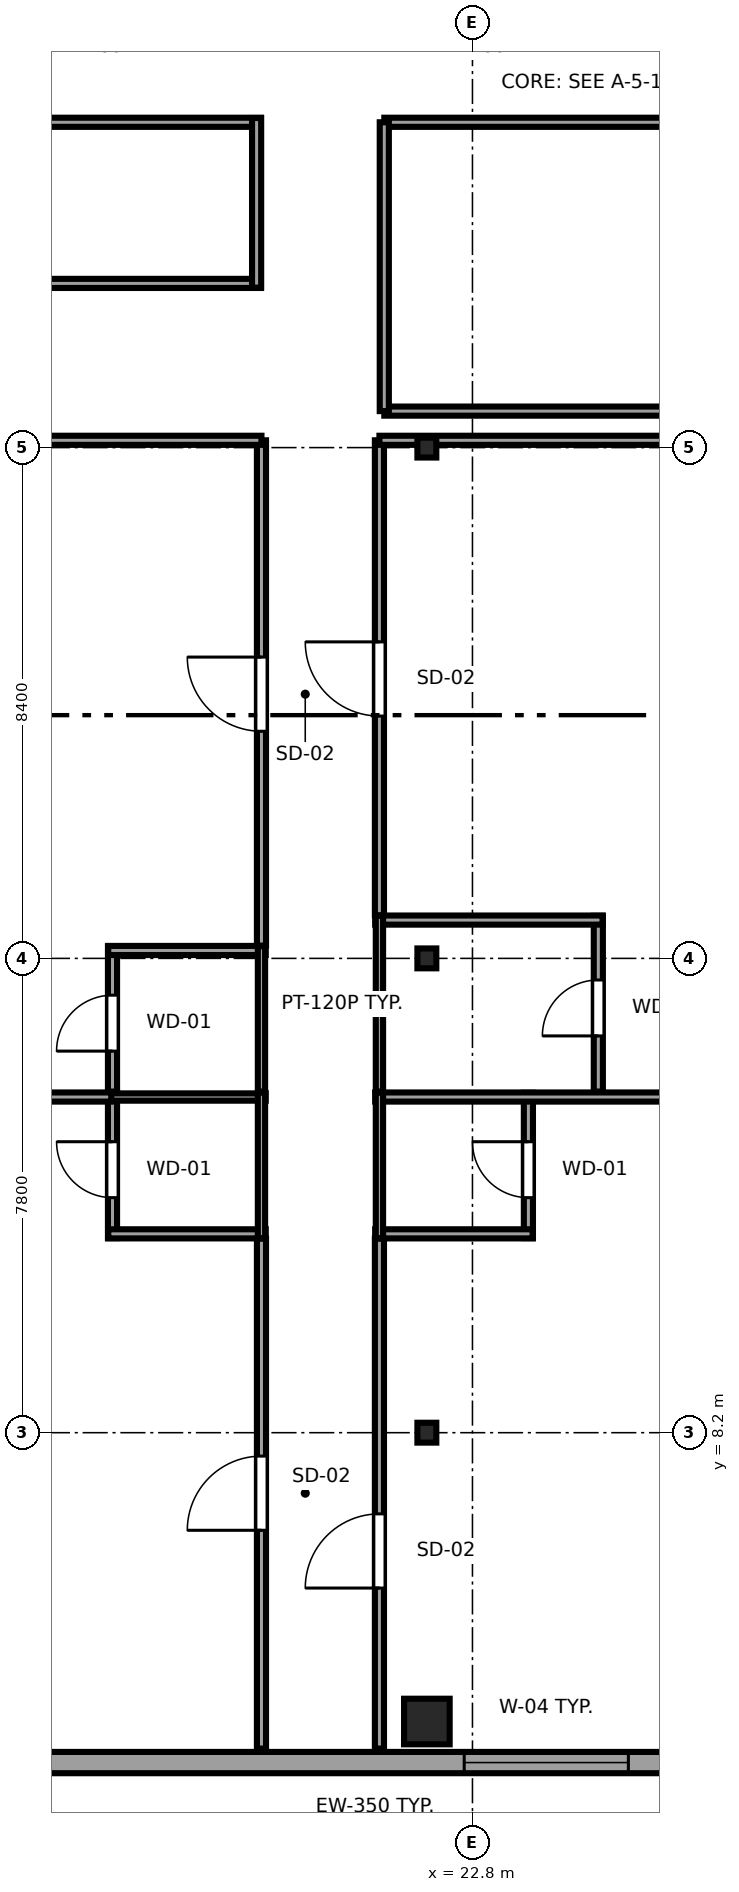
"""IFC4 building model, lengths in metres.
Left out: names, types, materials, properties, quantities, classifications, styles, units other than length and angle.
Written with IfcOpenShell. Run it as: python <this file> out.ifc"""

import sys

from ifc_helpers import new_model, si_unit, direction, frame, frame_2d, origin, origin_2d, place, context, subcontext, project, spatial, rectangle, i_section, extrude, source, transform, mapped, element, fill, save


model = new_model("IFC4")
c1 = context("Model", 3, precision=1e-05, world=origin(), true_north=direction((0.0, 1.0)))
c2 = subcontext(c1, "Body", "Model", "MODEL_VIEW")
j1 = project(units=[si_unit("LENGTHUNIT", "METRE"), si_unit("PLANEANGLEUNIT", "RADIAN")], contexts=[c1])
p1 = place(None, origin())
s1 = spatial("IfcSite", under=j1, at=p1, CompositionType="ELEMENT")
p2 = place(p1, origin())
s2 = spatial("IfcBuilding", under=s1, at=p2, CompositionType="ELEMENT")
p3 = place(p2, frame((0.0, 0.0, 223.9)))
s3 = spatial("IfcBuildingStorey", under=s2, at=p3, CompositionType="ELEMENT", Elevation=223.9)
m1 = source(origin(), c2, "Body", "SweptSolid", [
    extrude(rectangle(XDim=0.75, YDim=0.75, at=origin_2d()), origin(), (0.0, 0.0, 1.0), 3.55),
])
p4 = place(p3, frame((22.05, 3.45, 0.0), z_axis=(0.0, 0.0, 1.0), x_axis=(1.0, 0.0, 0.0)))
e1 = element("IfcColumn", 1, at=p4, inside=s3, PredefinedType="COLUMN", context=c2, shape_type="MappedRepresentation", body=[
    mapped(m1, transform((0.0, 0.0, 0.0), x_axis=(1.0, 0.0, 0.0), y_axis=(0.0, 1.0, 0.0), z_axis=(0.0, 0.0, 1.0), scale=1.0)),
])
m2 = source(origin(), c2, "Body", "SweptSolid", [
    extrude(i_section(OverallWidth=0.311, OverallDepth=0.327, WebThickness=0.016, FlangeThickness=0.025, FilletRadius=0.017, at=origin_2d()), origin(), (0.0, 0.0, 1.0), 3.55),
])
for number, where, z_axis, x_axis in (
    (2, (22.05, 8.2, 0.0), (0.0, 0.0, 1.0), (1.0, 0.0, 0.0)),
    (3, (22.05, 16.0, 0.0), (0.0, 0.0, 1.0), (1.0, 0.0, 0.0)),
    (4, (22.05, 24.4, 0.0), (0.0, 0.0, 1.0), (1.0, 0.0, 0.0)),
):
    element("IfcColumn", number, at=place(p3, frame(where, z_axis=z_axis, x_axis=x_axis)), inside=s3, PredefinedType="COLUMN", context=c2, shape_type="MappedRepresentation", body=[
        mapped(m2, transform((0.0, 0.0, 0.0), x_axis=(1.0, 0.0, 0.0), y_axis=(0.0, 1.0, 0.0), z_axis=(0.0, 0.0, 1.0), scale=1.0)),
    ])
p5 = place(p3, frame((7.017, 2.775, 0.0), z_axis=(0.0, 0.0, 1.0), x_axis=(1.0, 0.0, 0.0)))
e5 = element("IfcWall", 5, at=p5, inside=s3, PredefinedType="SOLIDWALL", context=c2, shape_type="SweptSolid", body=[
    extrude(rectangle(XDim=28.366, YDim=0.35, at=frame_2d((14.183, 0.0))), origin(), (0.0, 0.0, 1.0), 3.37),
])
p6 = place(p5, frame((1.514, 0.0, 0.68)))
e6 = element("IfcOpeningElement", 6, at=p6, cuts=e5, PredefinedType="OPENING", context=c2, shape_type="SweptSolid", body=[
    extrude(rectangle(XDim=2.7, YDim=1.95, at=frame_2d((1.35, 0.975))), frame((0.0, 0.185, 0.0), z_axis=(0.0, -1.0, 0.0), x_axis=(1.0, 0.0, 0.0)), (0.0, 0.0, 1.0), 0.37),
])
p7 = place(p5, frame((15.647, 0.0, 0.68)))
e7 = element("IfcOpeningElement", 7, at=p7, cuts=e5, PredefinedType="OPENING", context=c2, shape_type="SweptSolid", body=[
    extrude(rectangle(XDim=2.7, YDim=1.95, at=frame_2d((1.35, 0.975))), frame((0.0, 0.185, 0.0), z_axis=(0.0, -1.0, 0.0), x_axis=(1.0, 0.0, 0.0)), (0.0, 0.0, 1.0), 0.37),
])
p8 = place(p5, frame((24.152, 0.0, 0.68)))
e8 = element("IfcOpeningElement", 8, at=p8, cuts=e5, PredefinedType="OPENING", context=c2, shape_type="SweptSolid", body=[
    extrude(rectangle(XDim=2.7, YDim=1.95, at=frame_2d((1.35, 0.975))), frame((0.0, 0.185, 0.0), z_axis=(0.0, -1.0, 0.0), x_axis=(1.0, 0.0, 0.0)), (0.0, 0.0, 1.0), 0.37),
])
p9 = place(p3, frame((16.88, 11.4, 0.0), z_axis=(0.0, 0.0, 1.0), x_axis=(0.0, 1.0, 0.0)))
e9 = element("IfcWall", 9, at=p9, inside=s3, PredefinedType="PARTITIONING", context=c2, shape_type="SweptSolid", body=[
    extrude(rectangle(XDim=2.39, YDim=0.15, at=frame_2d((1.195, 0.0))), origin(), (0.0, 0.0, 1.0), 3.37),
])
p10 = place(p9, frame((0.665, 0.0, 0.0)))
e10 = element("IfcOpeningElement", 10, at=p10, cuts=e9, PredefinedType="OPENING", context=c2, shape_type="SweptSolid", body=[
    extrude(rectangle(XDim=0.92, YDim=2.01, at=frame_2d((0.46, 1.005))), frame((0.0, 0.085, 0.0), z_axis=(0.0, -1.0, 0.0), x_axis=(1.0, 0.0, 0.0)), (0.0, 0.0, 1.0), 0.17),
])
p11 = place(p3, frame((16.81, 11.47, 0.0), z_axis=(0.0, 0.0, 1.0), x_axis=(1.0, 0.0, 0.0)))
e11 = element("IfcWall", 11, at=p11, inside=s3, PredefinedType="PARTITIONING", context=c2, shape_type="SweptSolid", body=[
    extrude(rectangle(XDim=2.59, YDim=0.15, at=frame_2d((1.295, 0.0))), origin(), (0.0, 0.0, 1.0), 3.37),
])
p12 = place(p3, frame((16.81, 13.72, 0.0), z_axis=(0.0, 0.0, 1.0), x_axis=(1.0, 0.0, 0.0)))
e12 = element("IfcWall", 12, at=p12, inside=s3, PredefinedType="PLUMBINGWALL", context=c2, shape_type="SweptSolid", body=[
    extrude(rectangle(XDim=2.59, YDim=0.12, at=frame_2d((1.295, 0.0))), origin(), (0.0, 0.0, 1.0), 3.37),
])
p13 = place(p3, frame((19.33, 11.4, 0.0), z_axis=(0.0, 0.0, 1.0), x_axis=(0.0, 1.0, 0.0)))
e13 = element("IfcWall", 13, at=p13, inside=s3, PredefinedType="PLUMBINGWALL", context=c2, shape_type="SweptSolid", body=[
    extrude(rectangle(XDim=2.39, YDim=0.12, at=frame_2d((1.195, 0.0))), origin(), (0.0, 0.0, 1.0), 3.37),
])
p14 = place(p3, frame((16.88, 13.81, 0.0), z_axis=(0.0, 0.0, 1.0), x_axis=(0.0, 1.0, 0.0)))
e14 = element("IfcWall", 14, at=p14, inside=s3, PredefinedType="PARTITIONING", context=c2, shape_type="SweptSolid", body=[
    extrude(rectangle(XDim=2.39, YDim=0.15, at=frame_2d((1.195, 0.0))), origin(), (0.0, 0.0, 1.0), 3.37),
])
p15 = place(p14, frame((0.665, 0.0, 0.0)))
e15 = element("IfcOpeningElement", 15, at=p15, cuts=e14, PredefinedType="OPENING", context=c2, shape_type="SweptSolid", body=[
    extrude(rectangle(XDim=0.92, YDim=2.01, at=frame_2d((0.46, 1.005))), frame((0.0, 0.085, 0.0), z_axis=(0.0, -1.0, 0.0), x_axis=(1.0, 0.0, 0.0)), (0.0, 0.0, 1.0), 0.17),
])
p16 = place(p3, frame((16.81, 16.13, 0.0), z_axis=(0.0, 0.0, 1.0), x_axis=(1.0, 0.0, 0.0)))
e16 = element("IfcWall", 16, at=p16, inside=s3, PredefinedType="PARTITIONING", context=c2, shape_type="SweptSolid", body=[
    extrude(rectangle(XDim=2.59, YDim=0.15, at=frame_2d((1.295, 0.0))), origin(), (0.0, 0.0, 1.0), 2.758),
])
p17 = place(p3, frame((19.33, 13.81, 0.0), z_axis=(0.0, 0.0, 1.0), x_axis=(0.0, 1.0, 0.0)))
e17 = element("IfcWall", 17, at=p17, inside=s3, PredefinedType="PLUMBINGWALL", context=c2, shape_type="SweptSolid", body=[
    extrude(rectangle(XDim=2.39, YDim=0.12, at=frame_2d((1.195, 0.0))), origin(), (0.0, 0.0, 1.0), 3.37),
])
p18 = place(p3, frame((23.72, 11.4, 0.0), z_axis=(0.0, 0.0, 1.0), x_axis=(0.0, 1.0, 0.0)))
e18 = element("IfcWall", 18, at=p18, inside=s3, PredefinedType="PARTITIONING", context=c2, shape_type="SweptSolid", body=[
    extrude(rectangle(XDim=2.39, YDim=0.15, at=frame_2d((1.195, 0.0))), origin(), (0.0, 0.0, 1.0), 3.37),
])
p19 = place(p18, frame((0.665, 0.0, 0.0)))
e19 = element("IfcOpeningElement", 19, at=p19, cuts=e18, PredefinedType="OPENING", context=c2, shape_type="SweptSolid", body=[
    extrude(rectangle(XDim=0.92, YDim=2.01, at=frame_2d((0.46, 1.005))), frame((0.0, 0.085, 0.0), z_axis=(0.0, -1.0, 0.0), x_axis=(1.0, 0.0, 0.0)), (0.0, 0.0, 1.0), 0.17),
])
p20 = place(p3, frame((21.2, 11.47, 0.0), z_axis=(0.0, 0.0, 1.0), x_axis=(1.0, 0.0, 0.0)))
e20 = element("IfcWall", 20, at=p20, inside=s3, PredefinedType="PARTITIONING", context=c2, shape_type="SweptSolid", body=[
    extrude(rectangle(XDim=2.59, YDim=0.15, at=frame_2d((1.295, 0.0))), origin(), (0.0, 0.0, 1.0), 3.37),
])
p21 = place(p3, frame((21.2, 13.72, 0.0), z_axis=(0.0, 0.0, 1.0), x_axis=(1.0, 0.0, 0.0)))
e21 = element("IfcWall", 21, at=p21, inside=s3, PredefinedType="PARTITIONING", context=c2, shape_type="SweptSolid", body=[
    extrude(rectangle(XDim=18.195, YDim=0.15, at=frame_2d((9.098, 0.0))), origin(), (0.0, 0.0, 1.0), 3.37),
])
p22 = place(p3, frame((21.27, 11.4, 0.0), z_axis=(0.0, 0.0, 1.0), x_axis=(0.0, 1.0, 0.0)))
e22 = element("IfcWall", 22, at=p22, inside=s3, PredefinedType="PLUMBINGWALL", context=c2, shape_type="SweptSolid", body=[
    extrude(rectangle(XDim=2.39, YDim=0.12, at=frame_2d((1.195, 0.0))), origin(), (0.0, 0.0, 1.0), 3.37),
])
p23 = place(p3, frame((24.87, 13.81, 0.0), z_axis=(0.0, 0.0, 1.0), x_axis=(0.0, 1.0, 0.0)))
e23 = element("IfcWall", 23, at=p23, inside=s3, PredefinedType="PARTITIONING", context=c2, shape_type="SweptSolid", body=[
    extrude(rectangle(XDim=2.89, YDim=0.15, at=frame_2d((1.445, 0.0))), origin(), (0.0, 0.0, 1.0), 3.37),
])
p24 = place(p23, frame((0.915, 0.0, 0.0)))
e24 = element("IfcOpeningElement", 24, at=p24, cuts=e23, PredefinedType="OPENING", context=c2, shape_type="SweptSolid", body=[
    extrude(rectangle(XDim=0.92, YDim=2.01, at=frame_2d((0.46, 1.005))), frame((0.0, 0.085, 0.0), z_axis=(0.0, -1.0, 0.0), x_axis=(1.0, 0.0, 0.0)), (0.0, 0.0, 1.0), 0.17),
])
p25 = place(p3, frame((21.2, 16.63, 0.0), z_axis=(0.0, 0.0, 1.0), x_axis=(1.0, 0.0, 0.0)))
e25 = element("IfcWall", 25, at=p25, inside=s3, PredefinedType="PARTITIONING", context=c2, shape_type="SweptSolid", body=[
    extrude(rectangle(XDim=3.74, YDim=0.15, at=frame_2d((1.87, 0.0))), origin(), (0.0, 0.0, 1.0), 3.37),
])
p26 = place(p3, frame((21.27, 13.81, 0.0), z_axis=(0.0, 0.0, 1.0), x_axis=(0.0, 1.0, 0.0)))
e26 = element("IfcWall", 26, at=p26, inside=s3, PredefinedType="PLUMBINGWALL", context=c2, shape_type="SweptSolid", body=[
    extrude(rectangle(XDim=2.89, YDim=0.12, at=frame_2d((1.445, 0.0))), origin(), (0.0, 0.0, 1.0), 3.37),
])
p27 = place(p3, frame((19.33, 3.005, 0.0), z_axis=(0.0, 0.0, 1.0), x_axis=(0.0, 1.0, 0.0)))
e27 = element("IfcWall", 27, at=p27, inside=s3, PredefinedType="PARTITIONING", context=c2, shape_type="SweptSolid", body=[
    extrude(rectangle(XDim=8.385, YDim=0.15, at=frame_2d((4.192, 0.0))), origin(), (0.0, 0.0, 1.0), 3.37),
])
p28 = place(p27, frame((3.59, 0.0, 0.0)))
e28 = element("IfcOpeningElement", 28, at=p28, cuts=e27, PredefinedType="OPENING", context=c2, shape_type="SweptSolid", body=[
    extrude(rectangle(XDim=1.22, YDim=2.08, at=frame_2d((0.61, 1.04))), frame((0.0, 0.085, 0.0), z_axis=(0.0, -1.0, 0.0), x_axis=(1.0, 0.0, 0.0)), (0.0, 0.0, 1.0), 0.17),
])
p29 = place(p3, frame((2.9, 13.72, 0.0), z_axis=(0.0, 0.0, 1.0), x_axis=(1.0, 0.0, 0.0)))
e29 = element("IfcWall", 29, at=p29, inside=s3, PredefinedType="PARTITIONING", context=c2, shape_type="SweptSolid", body=[
    extrude(rectangle(XDim=13.96, YDim=0.15, at=frame_2d((6.98, 0.0))), origin(), (0.0, 0.0, 1.0), 3.37),
])
p30 = place(p3, frame((19.33, 16.21, 0.0), z_axis=(0.0, 0.0, 1.0), x_axis=(0.0, 1.0, 0.0)))
e30 = element("IfcWall", 30, at=p30, inside=s3, PredefinedType="PARTITIONING", context=c2, shape_type="SweptSolid", body=[
    extrude(rectangle(XDim=8.31, YDim=0.15, at=frame_2d((4.155, 0.0))), origin(), (0.0, 0.0, 1.0), 3.37),
])
p31 = place(p30, frame((3.525, 0.0, 0.0)))
e31 = element("IfcOpeningElement", 31, at=p31, cuts=e30, PredefinedType="OPENING", context=c2, shape_type="SweptSolid", body=[
    extrude(rectangle(XDim=1.22, YDim=2.08, at=frame_2d((0.61, 1.04))), frame((0.0, 0.085, 0.0), z_axis=(0.0, -1.0, 0.0), x_axis=(1.0, 0.0, 0.0)), (0.0, 0.0, 1.0), 0.17),
])
p32 = place(p3, frame((2.9, 24.52, 0.0), z_axis=(0.0, 0.0, 1.0), x_axis=(1.0, 0.0, 0.0)))
e32 = element("IfcWall", 32, at=p32, inside=s3, PredefinedType="PARTITIONING", context=c2, shape_type="SweptSolid", body=[
    extrude(rectangle(XDim=16.43, YDim=0.15, at=frame_2d((8.215, 0.0))), origin(), (0.0, 0.0, 1.0), 2.758),
])
p33 = place(p3, frame((21.27, 3.005, 0.0), z_axis=(0.0, 0.0, 1.0), x_axis=(0.0, 1.0, 0.0)))
e33 = element("IfcWall", 33, at=p33, inside=s3, PredefinedType="PARTITIONING", context=c2, shape_type="SweptSolid", body=[
    extrude(rectangle(XDim=8.385, YDim=0.15, at=frame_2d((4.192, 0.0))), origin(), (0.0, 0.0, 1.0), 3.37),
])
p34 = place(p33, frame((2.64, 0.0, 0.0)))
e34 = element("IfcOpeningElement", 34, at=p34, cuts=e33, PredefinedType="OPENING", context=c2, shape_type="SweptSolid", body=[
    extrude(rectangle(XDim=1.22, YDim=2.08, at=frame_2d((0.61, 1.04))), frame((0.0, 0.085, 0.0), z_axis=(0.0, -1.0, 0.0), x_axis=(1.0, 0.0, 0.0)), (0.0, 0.0, 1.0), 0.17),
])
p35 = place(p3, frame((21.27, 16.71, 0.0), z_axis=(0.0, 0.0, 1.0), x_axis=(0.0, 1.0, 0.0)))
e35 = element("IfcWall", 35, at=p35, inside=s3, PredefinedType="PARTITIONING", context=c2, shape_type="SweptSolid", body=[
    extrude(rectangle(XDim=7.81, YDim=0.15, at=frame_2d((3.905, 0.0))), origin(), (0.0, 0.0, 1.0), 3.37),
])
p36 = place(p35, frame((3.275, 0.0, 0.0)))
e36 = element("IfcOpeningElement", 36, at=p36, cuts=e35, PredefinedType="OPENING", context=c2, shape_type="SweptSolid", body=[
    extrude(rectangle(XDim=1.22, YDim=2.08, at=frame_2d((0.61, 1.04))), frame((0.0, 0.085, 0.0), z_axis=(0.0, -1.0, 0.0), x_axis=(1.0, 0.0, 0.0)), (0.0, 0.0, 1.0), 0.17),
])
p37 = place(p3, frame((21.27, 24.52, 0.0), z_axis=(0.0, 0.0, 1.0), x_axis=(1.0, 0.0, 0.0)))
e37 = element("IfcWall", 37, at=p37, inside=s3, PredefinedType="PARTITIONING", context=c2, shape_type="SweptSolid", body=[
    extrude(rectangle(XDim=18.125, YDim=0.15, at=frame_2d((9.062, 0.0))), origin(), (0.0, 0.0, 1.0), 2.758),
])
p38 = place(p3, frame((9.93, 27.1, 0.0), z_axis=(0.0, 0.0, 1.0), x_axis=(1.0, 0.0, 0.0)))
e38 = element("IfcWall", 38, at=p38, inside=s3, PredefinedType="PARTITIONING", context=c2, shape_type="SweptSolid", body=[
    extrude(rectangle(XDim=9.39, YDim=0.15, at=frame_2d((4.695, 0.0))), origin(), (0.0, 0.0, 1.0), 3.37),
])
p39 = place(p3, frame((9.93, 29.75, 0.0), z_axis=(0.0, 0.0, 1.0), x_axis=(1.0, 0.0, 0.0)))
e39 = element("IfcWall", 39, at=p39, inside=s3, PredefinedType="PARTITIONING", context=c2, shape_type="SweptSolid", body=[
    extrude(rectangle(XDim=9.39, YDim=0.15, at=frame_2d((4.695, 0.0))), origin(), (0.0, 0.0, 1.0), 3.37),
])
p40 = place(p39, frame((4.235, 0.0, 0.0)))
e40 = element("IfcOpeningElement", 40, at=p40, cuts=e39, PredefinedType="OPENING", context=c2, shape_type="SweptSolid", body=[
    extrude(rectangle(XDim=0.92, YDim=2.01, at=frame_2d((0.46, 1.005))), frame((0.0, 0.085, 0.0), z_axis=(0.0, -1.0, 0.0), x_axis=(1.0, 0.0, 0.0)), (0.0, 0.0, 1.0), 0.17),
])
p41 = place(p3, frame((19.25, 27.03, 0.0), z_axis=(0.0, 0.0, 1.0), x_axis=(0.0, 1.0, 0.0)))
e41 = element("IfcWall", 41, at=p41, inside=s3, PredefinedType="PARTITIONING", context=c2, shape_type="SweptSolid", body=[
    extrude(rectangle(XDim=2.79, YDim=0.15, at=frame_2d((1.395, 0.0))), origin(), (0.0, 0.0, 1.0), 3.37),
])
p42 = place(p3, frame((21.35, 25.0, 0.0), z_axis=(0.0, 0.0, 1.0), x_axis=(1.0, 0.0, 0.0)))
e42 = element("IfcWall", 42, at=p42, inside=s3, PredefinedType="PARTITIONING", context=c2, shape_type="SweptSolid", body=[
    extrude(rectangle(XDim=14.45, YDim=0.15, at=frame_2d((7.225, 0.0))), origin(), (0.0, 0.0, 1.0), 3.37),
])
p43 = place(p3, frame((21.35, 29.75, 0.0), z_axis=(0.0, 0.0, 1.0), x_axis=(1.0, 0.0, 0.0)))
e43 = element("IfcWall", 43, at=p43, inside=s3, PredefinedType="PARTITIONING", context=c2, shape_type="SweptSolid", body=[
    extrude(rectangle(XDim=14.45, YDim=0.15, at=frame_2d((7.225, 0.0))), origin(), (0.0, 0.0, 1.0), 3.37),
])
p44 = place(p43, frame((6.4, 0.0, 0.0)))
e44 = element("IfcOpeningElement", 44, at=p44, cuts=e43, PredefinedType="OPENING", context=c2, shape_type="SweptSolid", body=[
    extrude(rectangle(XDim=1.65, YDim=2.15, at=frame_2d((0.825, 1.075))), frame((0.0, 0.085, 0.0), z_axis=(0.0, -1.0, 0.0), x_axis=(1.0, 0.0, 0.0)), (0.0, 0.0, 1.0), 0.17),
])
p45 = place(p3, frame((21.35, 25.0, 0.0), z_axis=(0.0, 0.0, 1.0), x_axis=(0.0, 1.0, 0.0)))
e45 = element("IfcWall", 45, at=p45, inside=s3, PredefinedType="PARTITIONING", context=c2, shape_type="SweptSolid", body=[
    extrude(rectangle(XDim=4.75, YDim=0.15, at=frame_2d((2.375, 0.0))), origin(), (0.0, 0.0, 1.0), 3.37),
])
m3 = source(origin(), c2, "Body", "SweptSolid", [
    extrude(rectangle(XDim=2.7, YDim=1.95, at=frame_2d((1.35, 0.975))), frame((0.0, 0.09, 0.0), z_axis=(0.0, -1.0, 0.0), x_axis=(1.0, 0.0, 0.0)), (0.0, 0.0, 1.0), 0.06),
])
p46 = place(p7, origin())
e46 = element("IfcWindow", 46, at=p46, inside=s3, PartitioningType="TRIPLE_PANEL_HORIZONTAL", PredefinedType="WINDOW", context=c2, shape_type="MappedRepresentation", body=[
    mapped(m3, transform((0.0, 0.0, 0.0), x_axis=(1.0, 0.0, 0.0), y_axis=(0.0, 1.0, 0.0), z_axis=(0.0, 0.0, 1.0), scale=1.0)),
])
fill(e7, e46)
m4 = source(origin(), c2, "Body", "SweptSolid", [
    extrude(rectangle(XDim=0.92, YDim=2.01, at=frame_2d((0.46, 1.005))), frame((0.0, 0.025, 0.0), z_axis=(0.0, -1.0, 0.0), x_axis=(1.0, 0.0, 0.0)), (0.0, 0.0, 1.0), 0.05),
])
p47 = place(p10, origin())
e47 = element("IfcDoor", 47, at=p47, inside=s3, OperationType="SINGLE_SWING_RIGHT", PredefinedType="DOOR", context=c2, shape_type="MappedRepresentation", body=[
    mapped(m4, transform((0.0, 0.0, 0.0), x_axis=(1.0, 0.0, 0.0), y_axis=(0.0, 1.0, 0.0), z_axis=(0.0, 0.0, 1.0), scale=1.0)),
])
fill(e10, e47)
p48 = place(p15, origin())
e48 = element("IfcDoor", 48, at=p48, inside=s3, OperationType="SINGLE_SWING_LEFT", PredefinedType="DOOR", context=c2, shape_type="MappedRepresentation", body=[
    mapped(m4, transform((0.0, 0.0, 0.0), x_axis=(1.0, 0.0, 0.0), y_axis=(0.0, 1.0, 0.0), z_axis=(0.0, 0.0, 1.0), scale=1.0)),
])
fill(e15, e48)
p49 = place(p19, origin())
e49 = element("IfcDoor", 49, at=p49, inside=s3, OperationType="SINGLE_SWING_RIGHT", PredefinedType="DOOR", context=c2, shape_type="MappedRepresentation", body=[
    mapped(m4, transform((0.0, 0.0, 0.0), x_axis=(1.0, 0.0, 0.0), y_axis=(0.0, 1.0, 0.0), z_axis=(0.0, 0.0, 1.0), scale=1.0)),
])
fill(e19, e49)
p50 = place(p24, origin())
e50 = element("IfcDoor", 50, at=p50, inside=s3, OperationType="SINGLE_SWING_LEFT", PredefinedType="DOOR", context=c2, shape_type="MappedRepresentation", body=[
    mapped(m4, transform((0.0, 0.0, 0.0), x_axis=(1.0, 0.0, 0.0), y_axis=(0.0, 1.0, 0.0), z_axis=(0.0, 0.0, 1.0), scale=1.0)),
])
fill(e24, e50)
m5 = source(origin(), c2, "Body", "SweptSolid", [
    extrude(rectangle(XDim=1.22, YDim=2.08, at=frame_2d((0.61, 1.04))), frame((0.0, 0.025, 0.0), z_axis=(0.0, -1.0, 0.0), x_axis=(1.0, 0.0, 0.0)), (0.0, 0.0, 1.0), 0.05),
])
p51 = place(p28, origin())
e51 = element("IfcDoor", 51, at=p51, inside=s3, OperationType="SINGLE_SWING_LEFT", PredefinedType="DOOR", context=c2, shape_type="MappedRepresentation", body=[
    mapped(m5, transform((0.0, 0.0, 0.0), x_axis=(1.0, 0.0, 0.0), y_axis=(0.0, 1.0, 0.0), z_axis=(0.0, 0.0, 1.0), scale=1.0)),
])
fill(e28, e51)
p52 = place(p31, origin())
e52 = element("IfcDoor", 52, at=p52, inside=s3, OperationType="SINGLE_SWING_RIGHT", PredefinedType="DOOR", context=c2, shape_type="MappedRepresentation", body=[
    mapped(m5, transform((0.0, 0.0, 0.0), x_axis=(1.0, 0.0, 0.0), y_axis=(0.0, 1.0, 0.0), z_axis=(0.0, 0.0, 1.0), scale=1.0)),
])
fill(e31, e52)
p53 = place(p34, origin())
e53 = element("IfcDoor", 53, at=p53, inside=s3, OperationType="SINGLE_SWING_LEFT", PredefinedType="DOOR", context=c2, shape_type="MappedRepresentation", body=[
    mapped(m5, transform((0.0, 0.0, 0.0), x_axis=(1.0, 0.0, 0.0), y_axis=(0.0, 1.0, 0.0), z_axis=(0.0, 0.0, 1.0), scale=1.0)),
])
fill(e34, e53)
p54 = place(p36, origin())
e54 = element("IfcDoor", 54, at=p54, inside=s3, OperationType="SINGLE_SWING_RIGHT", PredefinedType="DOOR", context=c2, shape_type="MappedRepresentation", body=[
    mapped(m5, transform((0.0, 0.0, 0.0), x_axis=(1.0, 0.0, 0.0), y_axis=(0.0, 1.0, 0.0), z_axis=(0.0, 0.0, 1.0), scale=1.0)),
])
fill(e36, e54)
save(model, sys.argv[1])
